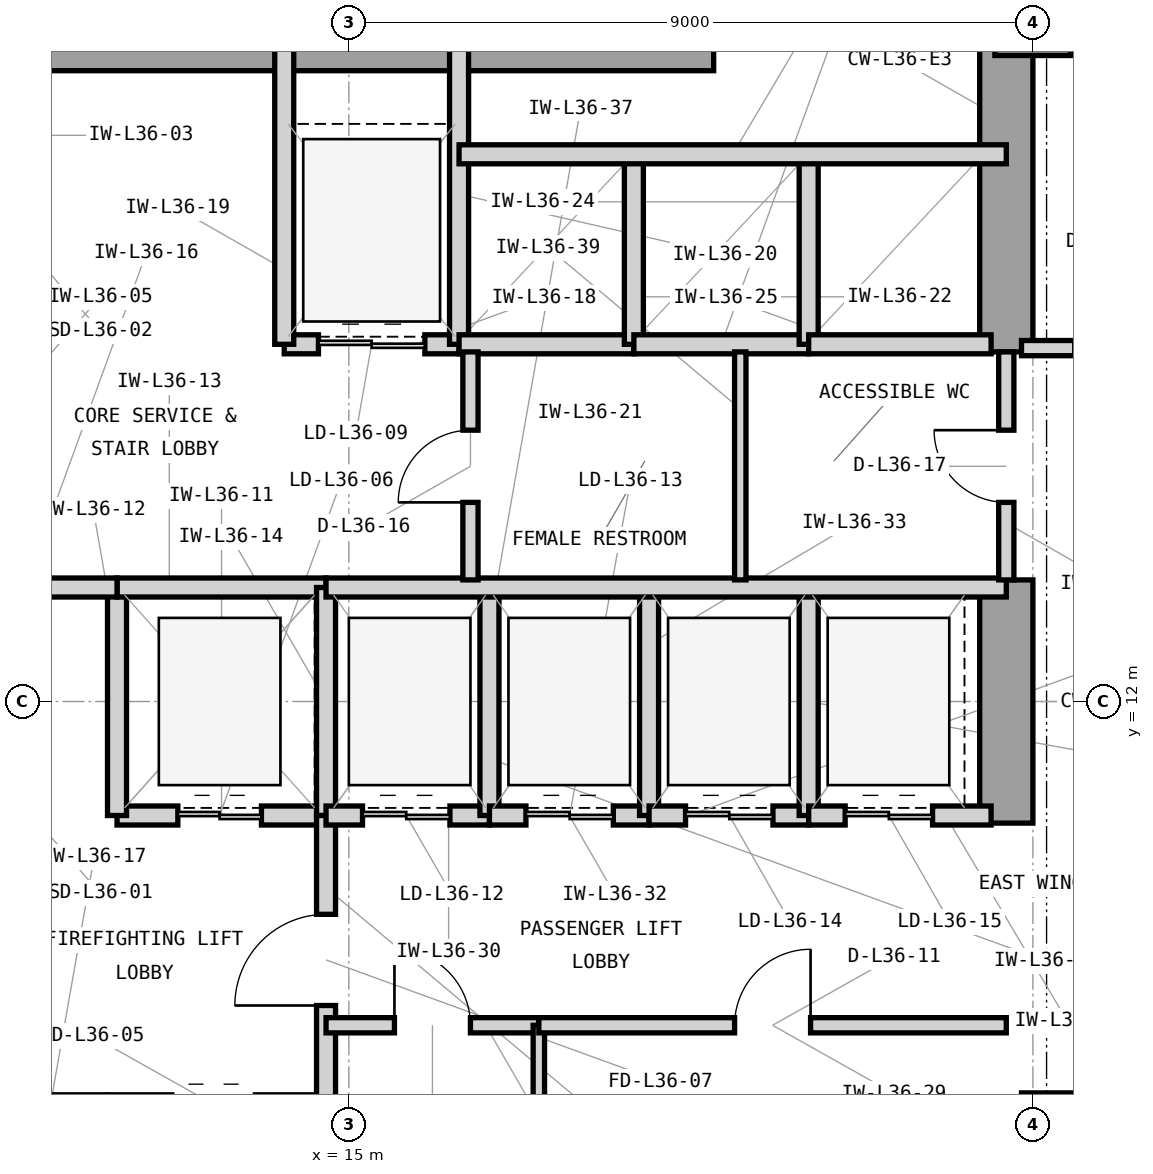
"""IFC4 building model, lengths in metres.
Left out: names, types, materials, properties, quantities, classifications, styles, units other than length and angle.
Written with IfcOpenShell. Run it as: python <this file> out.ifc"""

import sys

from ifc_helpers import new_model, si_unit, direction, frame, frame_2d, origin, origin_2d, place, context, subcontext, project, spatial, rectangle, extrude, element, fill, save


model = new_model("IFC4")
c1 = context("Model", 3, precision=1e-05, world=origin(), true_north=direction((0.0, 1.0)))
c2 = subcontext(c1, "Body", "Model", "MODEL_VIEW")
j1 = project(units=[si_unit("LENGTHUNIT", "METRE"), si_unit("PLANEANGLEUNIT", "RADIAN")], contexts=[c1])
p1 = place(None, origin())
s1 = spatial("IfcSite", under=j1, at=p1, CompositionType="ELEMENT")
p2 = place(p1, origin())
s2 = spatial("IfcBuilding", under=s1, at=p2, CompositionType="ELEMENT")
p3 = place(p2, frame((0.0, 0.0, 151.8)))
s3 = spatial("IfcBuildingStorey", under=s2, at=p3, CompositionType="ELEMENT", Elevation=151.8)
p4 = place(p3, frame((7.475, 20.65, 0.0), z_axis=(0.0, 0.0, 1.0), x_axis=(1.0, 0.0, 0.0)))
e1 = element("IfcWall", 1, at=p4, inside=s3, PredefinedType="SHEAR", context=c2, shape_type="SweptSolid", body=[
    extrude(rectangle(XDim=12.325, YDim=0.7, at=frame_2d((6.163, 0.0))), origin(), (0.0, 0.0, 1.0), 3.9),
])
p5 = place(p3, frame((23.65, 10.4, 0.0), z_axis=(0.0, 0.0, 1.0), x_axis=(0.0, 1.0, 0.0)))
e2 = element("IfcWall", 2, at=p5, inside=s3, PredefinedType="SHEAR", context=c2, shape_type="SweptSolid", body=[
    extrude(rectangle(XDim=3.2, YDim=0.7, at=frame_2d((1.6, 0.0))), origin(), (0.0, 0.0, 1.0), 3.9),
])
p6 = place(p3, frame((23.65, 16.6, 0.0), z_axis=(0.0, 0.0, 1.0), x_axis=(0.0, 1.0, 0.0)))
e3 = element("IfcWall", 3, at=p6, inside=s3, PredefinedType="SHEAR", context=c2, shape_type="SweptSolid", body=[
    extrude(rectangle(XDim=4.05, YDim=0.7, at=frame_2d((2.025, 0.0))), origin(), (0.0, 0.0, 1.0), 3.9),
])
p7 = place(p3, frame((24.0, 21.0, 0.0), z_axis=(0.0, 0.0, 1.0), x_axis=(1.0, 0.0, 0.0)))
e4 = element("IfcColumn", 4, at=p7, inside=s3, PredefinedType="COLUMN", context=c2, shape_type="SweptSolid", body=[
    extrude(rectangle(XDim=1.0, YDim=1.0, at=origin_2d()), origin(), (0.0, 0.0, 1.0), 3.9),
])
p8 = place(p3, frame((11.95, 10.5, 0.0), z_axis=(0.0, 0.0, 1.0), x_axis=(1.0, 0.0, 0.0)))
e5 = element("IfcWall", 5, at=p8, inside=s3, PredefinedType="PARTITIONING", context=c2, shape_type="SweptSolid", body=[
    extrude(rectangle(XDim=2.75, YDim=0.25, at=frame_2d((1.375, 0.0))), origin(), (0.0, 0.0, 1.0), 3.066),
])
p9 = place(p8, frame((0.8, 0.0, 0.0)))
e6 = element("IfcOpeningElement", 6, at=p9, cuts=e5, PredefinedType="OPENING", context=c2, shape_type="SweptSolid", body=[
    extrude(rectangle(XDim=1.1, YDim=2.25, at=frame_2d((0.55, 1.125))), frame((0.0, 0.135, 0.0), z_axis=(0.0, -1.0, 0.0), x_axis=(1.0, 0.0, 0.0)), (0.0, 0.0, 1.0), 0.27),
])
p10 = place(p3, frame((11.95, 10.5, 0.0), z_axis=(0.0, 0.0, 1.0), x_axis=(0.0, 1.0, 0.0)))
e7 = element("IfcWall", 7, at=p10, inside=s3, PredefinedType="PARTITIONING", context=c2, shape_type="SweptSolid", body=[
    extrude(rectangle(XDim=3.0, YDim=0.25, at=frame_2d((1.5, 0.0))), origin(), (0.0, 0.0, 1.0), 3.61),
])
p11 = place(p3, frame((11.95, 13.5, 0.0), z_axis=(0.0, 0.0, 1.0), x_axis=(1.0, 0.0, 0.0)))
e8 = element("IfcWall", 8, at=p11, inside=s3, PredefinedType="PARTITIONING", context=c2, shape_type="SweptSolid", body=[
    extrude(rectangle(XDim=2.75, YDim=0.25, at=frame_2d((1.375, 0.0))), origin(), (0.0, 0.0, 1.0), 3.066),
])
p12 = place(p3, frame((14.7, 10.5, 0.0), z_axis=(0.0, 0.0, 1.0), x_axis=(0.0, 1.0, 0.0)))
e9 = element("IfcWall", 9, at=p12, inside=s3, PredefinedType="PARTITIONING", context=c2, shape_type="SweptSolid", body=[
    extrude(rectangle(XDim=3.0, YDim=0.25, at=frame_2d((1.5, 0.0))), origin(), (0.0, 0.0, 1.0), 3.61),
])
p13 = place(p3, frame((14.7, 6.7, 0.0), z_axis=(0.0, 0.0, 1.0), x_axis=(0.0, 1.0, 0.0)))
e10 = element("IfcWall", 10, at=p13, inside=s3, PredefinedType="PARTITIONING", context=c2, shape_type="SweptSolid", body=[
    extrude(rectangle(XDim=3.8, YDim=0.25, at=frame_2d((1.9, 0.0))), origin(), (0.0, 0.0, 1.0), 3.61),
])
p14 = place(p13, frame((1.3, 0.0, 0.0)))
e11 = element("IfcOpeningElement", 11, at=p14, cuts=e10, PredefinedType="OPENING", context=c2, shape_type="SweptSolid", body=[
    extrude(rectangle(XDim=1.2, YDim=2.2, at=frame_2d((0.6, 1.1))), frame((0.0, 0.135, 0.0), z_axis=(0.0, -1.0, 0.0), x_axis=(1.0, 0.0, 0.0)), (0.0, 0.0, 1.0), 0.27),
])
p15 = place(p3, frame((10.33, 13.5, 0.0), z_axis=(0.0, 0.0, 1.0), x_axis=(1.0, 0.0, 0.0)))
e12 = element("IfcWall", 12, at=p15, inside=s3, PredefinedType="PARTITIONING", context=c2, shape_type="SweptSolid", body=[
    extrude(rectangle(XDim=1.62, YDim=0.25, at=frame_2d((0.81, 0.0))), origin(), (0.0, 0.0, 1.0), 3.066),
])
p16 = place(p3, frame((14.15, 16.7, 0.0), z_axis=(0.0, 0.0, 1.0), x_axis=(1.0, 0.0, 0.0)))
e13 = element("IfcWall", 13, at=p16, inside=s3, PredefinedType="PARTITIONING", context=c2, shape_type="SweptSolid", body=[
    extrude(rectangle(XDim=2.3, YDim=0.25, at=frame_2d((1.15, 0.0))), origin(), (0.0, 0.0, 1.0), 3.066),
])
p17 = place(p16, frame((0.45, 0.0, 0.0)))
e14 = element("IfcOpeningElement", 14, at=p17, cuts=e13, PredefinedType="OPENING", context=c2, shape_type="SweptSolid", body=[
    extrude(rectangle(XDim=1.4, YDim=2.35, at=frame_2d((0.7, 1.175))), frame((0.0, 0.135, 0.0), z_axis=(0.0, -1.0, 0.0), x_axis=(1.0, 0.0, 0.0)), (0.0, 0.0, 1.0), 0.27),
])
for number, where, z_axis, x_axis in (
    (15, (14.15, 16.7, 0.0), (0.0, 0.0, 1.0), (0.0, 1.0, 0.0)),
    (16, (16.45, 16.7, 0.0), (0.0, 0.0, 1.0), (0.0, 1.0, 0.0)),
):
    element("IfcWall", number, at=place(p3, frame(where, z_axis=z_axis, x_axis=x_axis)), inside=s3, PredefinedType="PARTITIONING", context=c2, shape_type="SweptSolid", body=[
        extrude(rectangle(XDim=3.95, YDim=0.25, at=frame_2d((1.975, 0.0))), origin(), (0.0, 0.0, 1.0), 3.61),
    ])
p18 = place(p3, frame((16.45, 16.7, 0.0), z_axis=(0.0, 0.0, 1.0), x_axis=(1.0, 0.0, 0.0)))
e17 = element("IfcWall", 17, at=p18, inside=s3, PredefinedType="PARTITIONING", context=c2, shape_type="SweptSolid", body=[
    extrude(rectangle(XDim=2.3, YDim=0.25, at=frame_2d((1.15, 0.0))), origin(), (0.0, 0.0, 1.0), 3.066),
])
p19 = place(p3, frame((18.75, 16.7, 0.0), z_axis=(0.0, 0.0, 1.0), x_axis=(0.0, 1.0, 0.0)))
e18 = element("IfcWall", 18, at=p19, inside=s3, PredefinedType="PARTITIONING", context=c2, shape_type="SweptSolid", body=[
    extrude(rectangle(XDim=2.5, YDim=0.25, at=frame_2d((1.25, 0.0))), origin(), (0.0, 0.0, 1.0), 3.61),
])
p20 = place(p3, frame((18.75, 16.7, 0.0), z_axis=(0.0, 0.0, 1.0), x_axis=(1.0, 0.0, 0.0)))
e19 = element("IfcWall", 19, at=p20, inside=s3, PredefinedType="PARTITIONING", context=c2, shape_type="SweptSolid", body=[
    extrude(rectangle(XDim=2.3, YDim=0.25, at=frame_2d((1.15, 0.0))), origin(), (0.0, 0.0, 1.0), 3.066),
])
p21 = place(p3, frame((21.05, 16.7, 0.0), z_axis=(0.0, 0.0, 1.0), x_axis=(0.0, 1.0, 0.0)))
e20 = element("IfcWall", 20, at=p21, inside=s3, PredefinedType="PARTITIONING", context=c2, shape_type="SweptSolid", body=[
    extrude(rectangle(XDim=2.5, YDim=0.25, at=frame_2d((1.25, 0.0))), origin(), (0.0, 0.0, 1.0), 3.61),
])
p22 = place(p3, frame((21.05, 16.7, 0.0), z_axis=(0.0, 0.0, 1.0), x_axis=(1.0, 0.0, 0.0)))
e21 = element("IfcWall", 21, at=p22, inside=s3, PredefinedType="PARTITIONING", context=c2, shape_type="SweptSolid", body=[
    extrude(rectangle(XDim=2.4, YDim=0.25, at=frame_2d((1.2, 0.0))), origin(), (0.0, 0.0, 1.0), 3.066),
])
p23 = place(p3, frame((16.45, 19.2, 0.0), z_axis=(0.0, 0.0, 1.0), x_axis=(1.0, 0.0, 0.0)))
e22 = element("IfcWall", 22, at=p23, inside=s3, PredefinedType="PARTITIONING", context=c2, shape_type="SweptSolid", body=[
    extrude(rectangle(XDim=7.2, YDim=0.25, at=frame_2d((3.6, 0.0))), origin(), (0.0, 0.0, 1.0), 3.61),
])
p24 = place(p3, frame((14.7, 7.74, 0.0), z_axis=(0.0, 0.0, 1.0), x_axis=(1.0, 0.0, 0.0)))
e23 = element("IfcWall", 23, at=p24, inside=s3, PredefinedType="PARTITIONING", context=c2, shape_type="SweptSolid", body=[
    extrude(rectangle(XDim=2.8, YDim=0.2, at=frame_2d((1.4, 0.0))), origin(), (0.0, 0.0, 1.0), 3.61),
])
p25 = place(p24, frame((0.9, 0.0, 0.0)))
e24 = element("IfcOpeningElement", 24, at=p25, cuts=e23, PredefinedType="OPENING", context=c2, shape_type="SweptSolid", body=[
    extrude(rectangle(XDim=1.0, YDim=2.15, at=frame_2d((0.5, 1.075))), frame((0.0, 0.11, 0.0), z_axis=(0.0, -1.0, 0.0), x_axis=(1.0, 0.0, 0.0)), (0.0, 0.0, 1.0), 0.22),
])
p26 = place(p3, frame((17.5, 3.35, 0.0), z_axis=(0.0, 0.0, 1.0), x_axis=(0.0, 1.0, 0.0)))
e25 = element("IfcWall", 25, at=p26, inside=s3, PredefinedType="PARTITIONING", context=c2, shape_type="SweptSolid", body=[
    extrude(rectangle(XDim=4.39, YDim=0.15, at=frame_2d((2.195, 0.0))), origin(), (0.0, 0.0, 1.0), 3.61),
])
p27 = place(p3, frame((17.5, 7.74, 0.0), z_axis=(0.0, 0.0, 1.0), x_axis=(1.0, 0.0, 0.0)))
e26 = element("IfcWall", 26, at=p27, inside=s3, PredefinedType="PARTITIONING", context=c2, shape_type="SweptSolid", body=[
    extrude(rectangle(XDim=6.15, YDim=0.2, at=frame_2d((3.075, 0.0))), origin(), (0.0, 0.0, 1.0), 3.61),
])
p28 = place(p27, frame((2.575, 0.0, 0.0)))
e27 = element("IfcOpeningElement", 27, at=p28, cuts=e26, PredefinedType="OPENING", context=c2, shape_type="SweptSolid", body=[
    extrude(rectangle(XDim=1.0, YDim=2.15, at=frame_2d((0.5, 1.075))), frame((0.0, 0.11, 0.0), z_axis=(0.0, -1.0, 0.0), x_axis=(1.0, 0.0, 0.0)), (0.0, 0.0, 1.0), 0.22),
])
p29 = place(p3, frame((14.7, 10.5, 0.0), z_axis=(0.0, 0.0, 1.0), x_axis=(1.0, 0.0, 0.0)))
e28 = element("IfcWall", 28, at=p29, inside=s3, PredefinedType="PARTITIONING", context=c2, shape_type="SweptSolid", body=[
    extrude(rectangle(XDim=2.15, YDim=0.25, at=frame_2d((1.075, 0.0))), origin(), (0.0, 0.0, 1.0), 3.066),
])
p30 = place(p29, frame((0.48, 0.0, 0.0)))
e29 = element("IfcOpeningElement", 29, at=p30, cuts=e28, PredefinedType="OPENING", context=c2, shape_type="SweptSolid", body=[
    extrude(rectangle(XDim=1.15, YDim=2.25, at=frame_2d((0.575, 1.125))), frame((0.0, 0.135, 0.0), z_axis=(0.0, -1.0, 0.0), x_axis=(1.0, 0.0, 0.0)), (0.0, 0.0, 1.0), 0.27),
])
p31 = place(p3, frame((16.85, 10.5, 0.0), z_axis=(0.0, 0.0, 1.0), x_axis=(0.0, 1.0, 0.0)))
e30 = element("IfcWall", 30, at=p31, inside=s3, PredefinedType="PARTITIONING", context=c2, shape_type="SweptSolid", body=[
    extrude(rectangle(XDim=3.0, YDim=0.25, at=frame_2d((1.5, 0.0))), origin(), (0.0, 0.0, 1.0), 3.61),
])
p32 = place(p3, frame((16.85, 10.5, 0.0), z_axis=(0.0, 0.0, 1.0), x_axis=(1.0, 0.0, 0.0)))
e31 = element("IfcWall", 31, at=p32, inside=s3, PredefinedType="PARTITIONING", context=c2, shape_type="SweptSolid", body=[
    extrude(rectangle(XDim=2.1, YDim=0.25, at=frame_2d((1.05, 0.0))), origin(), (0.0, 0.0, 1.0), 3.066),
])
p33 = place(p32, frame((0.48, 0.0, 0.0)))
e32 = element("IfcOpeningElement", 32, at=p33, cuts=e31, PredefinedType="OPENING", context=c2, shape_type="SweptSolid", body=[
    extrude(rectangle(XDim=1.15, YDim=2.25, at=frame_2d((0.575, 1.125))), frame((0.0, 0.135, 0.0), z_axis=(0.0, -1.0, 0.0), x_axis=(1.0, 0.0, 0.0)), (0.0, 0.0, 1.0), 0.27),
])
p34 = place(p3, frame((18.95, 10.5, 0.0), z_axis=(0.0, 0.0, 1.0), x_axis=(0.0, 1.0, 0.0)))
e33 = element("IfcWall", 33, at=p34, inside=s3, PredefinedType="PARTITIONING", context=c2, shape_type="SweptSolid", body=[
    extrude(rectangle(XDim=3.0, YDim=0.25, at=frame_2d((1.5, 0.0))), origin(), (0.0, 0.0, 1.0), 3.61),
])
p35 = place(p3, frame((18.95, 10.5, 0.0), z_axis=(0.0, 0.0, 1.0), x_axis=(1.0, 0.0, 0.0)))
e34 = element("IfcWall", 34, at=p35, inside=s3, PredefinedType="PARTITIONING", context=c2, shape_type="SweptSolid", body=[
    extrude(rectangle(XDim=2.1, YDim=0.25, at=frame_2d((1.05, 0.0))), origin(), (0.0, 0.0, 1.0), 3.066),
])
p36 = place(p35, frame((0.48, 0.0, 0.0)))
e35 = element("IfcOpeningElement", 35, at=p36, cuts=e34, PredefinedType="OPENING", context=c2, shape_type="SweptSolid", body=[
    extrude(rectangle(XDim=1.15, YDim=2.25, at=frame_2d((0.575, 1.125))), frame((0.0, 0.135, 0.0), z_axis=(0.0, -1.0, 0.0), x_axis=(1.0, 0.0, 0.0)), (0.0, 0.0, 1.0), 0.27),
])
p37 = place(p3, frame((21.05, 10.5, 0.0), z_axis=(0.0, 0.0, 1.0), x_axis=(0.0, 1.0, 0.0)))
e36 = element("IfcWall", 36, at=p37, inside=s3, PredefinedType="PARTITIONING", context=c2, shape_type="SweptSolid", body=[
    extrude(rectangle(XDim=3.0, YDim=0.25, at=frame_2d((1.5, 0.0))), origin(), (0.0, 0.0, 1.0), 3.61),
])
p38 = place(p3, frame((21.05, 10.5, 0.0), z_axis=(0.0, 0.0, 1.0), x_axis=(1.0, 0.0, 0.0)))
e37 = element("IfcWall", 37, at=p38, inside=s3, PredefinedType="PARTITIONING", context=c2, shape_type="SweptSolid", body=[
    extrude(rectangle(XDim=2.4, YDim=0.25, at=frame_2d((1.2, 0.0))), origin(), (0.0, 0.0, 1.0), 3.066),
])
p39 = place(p38, frame((0.48, 0.0, 0.0)))
e38 = element("IfcOpeningElement", 38, at=p39, cuts=e37, PredefinedType="OPENING", context=c2, shape_type="SweptSolid", body=[
    extrude(rectangle(XDim=1.15, YDim=2.25, at=frame_2d((0.575, 1.125))), frame((0.0, 0.135, 0.0), z_axis=(0.0, -1.0, 0.0), x_axis=(1.0, 0.0, 0.0)), (0.0, 0.0, 1.0), 0.27),
])
p40 = place(p3, frame((14.7, 13.5, 0.0), z_axis=(0.0, 0.0, 1.0), x_axis=(1.0, 0.0, 0.0)))
e39 = element("IfcWall", 39, at=p40, inside=s3, PredefinedType="PARTITIONING", context=c2, shape_type="SweptSolid", body=[
    extrude(rectangle(XDim=8.95, YDim=0.25, at=frame_2d((4.475, 0.0))), origin(), (0.0, 0.0, 1.0), 3.066),
])
p41 = place(p3, frame((16.6, 13.6, 0.0), z_axis=(0.0, 0.0, 1.0), x_axis=(0.0, 1.0, 0.0)))
e40 = element("IfcWall", 40, at=p41, inside=s3, PredefinedType="PARTITIONING", context=c2, shape_type="SweptSolid", body=[
    extrude(rectangle(XDim=3.0, YDim=0.2, at=frame_2d((1.5, 0.0))), origin(), (0.0, 0.0, 1.0), 3.61),
])
p42 = place(p41, frame((1.02, 0.0, 0.0)))
e41 = element("IfcOpeningElement", 41, at=p42, cuts=e40, PredefinedType="OPENING", context=c2, shape_type="SweptSolid", body=[
    extrude(rectangle(XDim=0.95, YDim=2.1, at=frame_2d((0.475, 1.05))), frame((0.0, 0.11, 0.0), z_axis=(0.0, -1.0, 0.0), x_axis=(1.0, 0.0, 0.0)), (0.0, 0.0, 1.0), 0.22),
])
p43 = place(p3, frame((20.15, 13.6, 0.0), z_axis=(0.0, 0.0, 1.0), x_axis=(0.0, 1.0, 0.0)))
e42 = element("IfcWall", 42, at=p43, inside=s3, PredefinedType="PARTITIONING", context=c2, shape_type="SweptSolid", body=[
    extrude(rectangle(XDim=3.0, YDim=0.15, at=frame_2d((1.5, 0.0))), origin(), (0.0, 0.0, 1.0), 3.61),
])
p44 = place(p3, frame((23.65, 13.6, 0.0), z_axis=(0.0, 0.0, 1.0), x_axis=(0.0, 1.0, 0.0)))
e43 = element("IfcWall", 43, at=p44, inside=s3, PredefinedType="PARTITIONING", context=c2, shape_type="SweptSolid", body=[
    extrude(rectangle(XDim=3.0, YDim=0.2, at=frame_2d((1.5, 0.0))), origin(), (0.0, 0.0, 1.0), 3.61),
])
p45 = place(p44, frame((1.02, 0.0, 0.0)))
e44 = element("IfcOpeningElement", 44, at=p45, cuts=e43, PredefinedType="OPENING", context=c2, shape_type="SweptSolid", body=[
    extrude(rectangle(XDim=0.95, YDim=2.1, at=frame_2d((0.475, 1.05))), frame((0.0, 0.11, 0.0), z_axis=(0.0, -1.0, 0.0), x_axis=(1.0, 0.0, 0.0)), (0.0, 0.0, 1.0), 0.22),
])
p46 = place(p3, frame((23.85, 6.75, 0.0), z_axis=(0.0, 0.0, 1.0), x_axis=(1.0, 0.0, 0.0)))
e45 = element("IfcWall", 45, at=p46, inside=s3, PredefinedType="PARTITIONING", context=c2, shape_type="SweptSolid", body=[
    extrude(rectangle(XDim=2.85, YDim=0.2, at=frame_2d((1.425, 0.0))), origin(), (0.0, 0.0, 1.0), 3.61),
])
p47 = place(p46, frame((0.7, 0.0, 0.0)))
e46 = element("IfcOpeningElement", 46, at=p47, cuts=e45, PredefinedType="OPENING", context=c2, shape_type="SweptSolid", body=[
    extrude(rectangle(XDim=1.0, YDim=2.15, at=frame_2d((0.5, 1.075))), frame((0.0, 0.11, 0.0), z_axis=(0.0, -1.0, 0.0), x_axis=(1.0, 0.0, 0.0)), (0.0, 0.0, 1.0), 0.22),
])
p48 = place(p3, frame((23.85, 16.65, 0.0), z_axis=(0.0, 0.0, 1.0), x_axis=(1.0, 0.0, 0.0)))
e47 = element("IfcWall", 47, at=p48, inside=s3, PredefinedType="PARTITIONING", context=c2, shape_type="SweptSolid", body=[
    extrude(rectangle(XDim=2.85, YDim=0.2, at=frame_2d((1.425, 0.0))), origin(), (0.0, 0.0, 1.0), 3.61),
])
p49 = place(p48, frame((0.7, 0.0, 0.0)))
e48 = element("IfcOpeningElement", 48, at=p49, cuts=e47, PredefinedType="OPENING", context=c2, shape_type="SweptSolid", body=[
    extrude(rectangle(XDim=1.0, YDim=2.15, at=frame_2d((0.5, 1.075))), frame((0.0, 0.11, 0.0), z_axis=(0.0, -1.0, 0.0), x_axis=(1.0, 0.0, 0.0)), (0.0, 0.0, 1.0), 0.22),
])
p50 = place(p9, origin())
e49 = element("IfcDoor", 49, at=p50, inside=s3, OperationType="DOUBLE_DOOR_SLIDING", PredefinedType="DOOR", context=c2, shape_type="SweptSolid", body=[
    extrude(rectangle(XDim=1.1, YDim=2.25, at=frame_2d((0.55, 1.125))), frame((0.0, 0.025, 0.0), z_axis=(0.0, -1.0, 0.0), x_axis=(1.0, 0.0, 0.0)), (0.0, 0.0, 1.0), 0.05),
])
fill(e6, e49)
p51 = place(p14, origin())
e50 = element("IfcDoor", 50, at=p51, inside=s3, OperationType="SINGLE_SWING_LEFT", PredefinedType="DOOR", context=c2, shape_type="SweptSolid", body=[
    extrude(rectangle(XDim=1.2, YDim=2.2, at=frame_2d((0.6, 1.1))), frame((0.0, 0.025, 0.0), z_axis=(0.0, -1.0, 0.0), x_axis=(1.0, 0.0, 0.0)), (0.0, 0.0, 1.0), 0.05),
])
fill(e11, e50)
p52 = place(p17, origin())
e51 = element("IfcDoor", 51, at=p52, inside=s3, OperationType="DOUBLE_DOOR_SLIDING", PredefinedType="DOOR", context=c2, shape_type="SweptSolid", body=[
    extrude(rectangle(XDim=1.4, YDim=2.35, at=frame_2d((0.7, 1.175))), frame((0.0, 0.025, 0.0), z_axis=(0.0, -1.0, 0.0), x_axis=(1.0, 0.0, 0.0)), (0.0, 0.0, 1.0), 0.05),
])
fill(e14, e51)
p53 = place(p25, origin())
e52 = element("IfcDoor", 52, at=p53, inside=s3, OperationType="SINGLE_SWING_LEFT", PredefinedType="DOOR", context=c2, shape_type="SweptSolid", body=[
    extrude(rectangle(XDim=1.0, YDim=2.15, at=frame_2d((0.5, 1.075))), frame((0.0, 0.025, 0.0), z_axis=(0.0, -1.0, 0.0), x_axis=(1.0, 0.0, 0.0)), (0.0, 0.0, 1.0), 0.05),
])
fill(e24, e52)
p54 = place(p28, origin())
e53 = element("IfcDoor", 53, at=p54, inside=s3, OperationType="SINGLE_SWING_RIGHT", PredefinedType="DOOR", context=c2, shape_type="SweptSolid", body=[
    extrude(rectangle(XDim=1.0, YDim=2.15, at=frame_2d((0.5, 1.075))), frame((0.0, 0.025, 0.0), z_axis=(0.0, -1.0, 0.0), x_axis=(1.0, 0.0, 0.0)), (0.0, 0.0, 1.0), 0.05),
])
fill(e27, e53)
p55 = place(p30, origin())
e54 = element("IfcDoor", 54, at=p55, inside=s3, OperationType="DOUBLE_DOOR_SLIDING", PredefinedType="DOOR", context=c2, shape_type="SweptSolid", body=[
    extrude(rectangle(XDim=1.15, YDim=2.25, at=frame_2d((0.575, 1.125))), frame((0.0, 0.025, 0.0), z_axis=(0.0, -1.0, 0.0), x_axis=(1.0, 0.0, 0.0)), (0.0, 0.0, 1.0), 0.05),
])
fill(e29, e54)
p56 = place(p33, origin())
e55 = element("IfcDoor", 55, at=p56, inside=s3, OperationType="DOUBLE_DOOR_SLIDING", PredefinedType="DOOR", context=c2, shape_type="SweptSolid", body=[
    extrude(rectangle(XDim=1.15, YDim=2.25, at=frame_2d((0.575, 1.125))), frame((0.0, 0.025, 0.0), z_axis=(0.0, -1.0, 0.0), x_axis=(1.0, 0.0, 0.0)), (0.0, 0.0, 1.0), 0.05),
])
fill(e32, e55)
p57 = place(p36, origin())
e56 = element("IfcDoor", 56, at=p57, inside=s3, OperationType="DOUBLE_DOOR_SLIDING", PredefinedType="DOOR", context=c2, shape_type="SweptSolid", body=[
    extrude(rectangle(XDim=1.15, YDim=2.25, at=frame_2d((0.575, 1.125))), frame((0.0, 0.025, 0.0), z_axis=(0.0, -1.0, 0.0), x_axis=(1.0, 0.0, 0.0)), (0.0, 0.0, 1.0), 0.05),
])
fill(e35, e56)
p58 = place(p39, origin())
e57 = element("IfcDoor", 57, at=p58, inside=s3, OperationType="DOUBLE_DOOR_SLIDING", PredefinedType="DOOR", context=c2, shape_type="SweptSolid", body=[
    extrude(rectangle(XDim=1.15, YDim=2.25, at=frame_2d((0.575, 1.125))), frame((0.0, 0.025, 0.0), z_axis=(0.0, -1.0, 0.0), x_axis=(1.0, 0.0, 0.0)), (0.0, 0.0, 1.0), 0.05),
])
fill(e38, e57)
p59 = place(p42, origin())
e58 = element("IfcDoor", 58, at=p59, inside=s3, OperationType="SINGLE_SWING_LEFT", PredefinedType="DOOR", context=c2, shape_type="SweptSolid", body=[
    extrude(rectangle(XDim=0.95, YDim=2.1, at=frame_2d((0.475, 1.05))), frame((0.0, 0.025, 0.0), z_axis=(0.0, -1.0, 0.0), x_axis=(1.0, 0.0, 0.0)), (0.0, 0.0, 1.0), 0.05),
])
fill(e41, e58)
p60 = place(p45, origin())
e59 = element("IfcDoor", 59, at=p60, inside=s3, OperationType="SINGLE_SWING_RIGHT", PredefinedType="DOOR", context=c2, shape_type="SweptSolid", body=[
    extrude(rectangle(XDim=0.95, YDim=2.1, at=frame_2d((0.475, 1.05))), frame((0.0, 0.025, 0.0), z_axis=(0.0, -1.0, 0.0), x_axis=(1.0, 0.0, 0.0)), (0.0, 0.0, 1.0), 0.05),
])
fill(e44, e59)
save(model, sys.argv[1])
